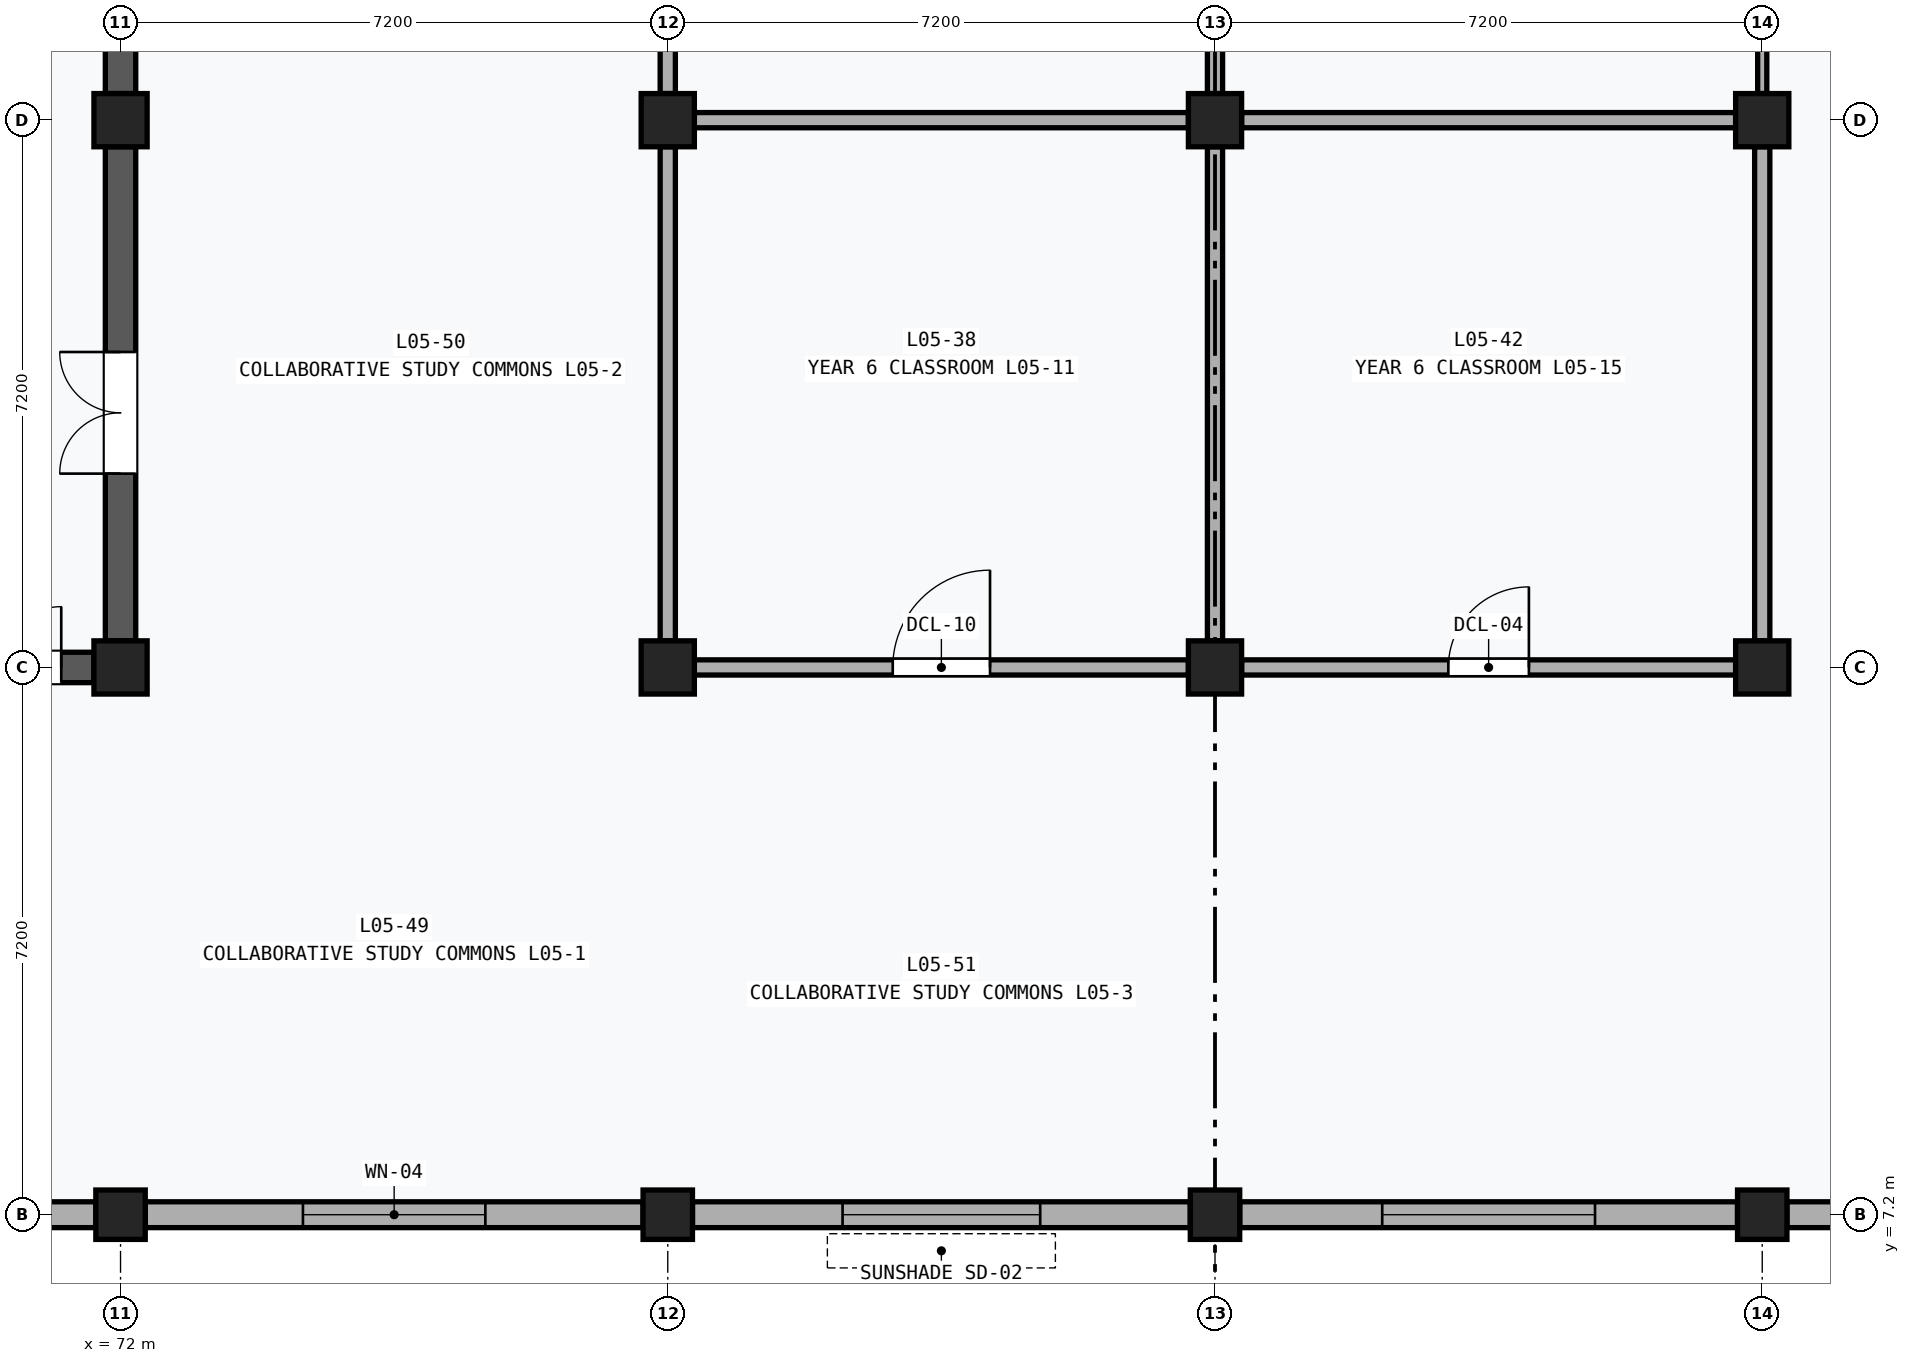
"""IFC4 building model, lengths in metres.
Left out: names, types, materials, properties, quantities, classifications, styles, units other than length and angle.
Written with IfcOpenShell. Run it as: python <this file> out.ifc"""

import sys

from ifc_helpers import new_model, si_unit, direction, frame, frame_2d, origin, origin_2d, place, context, subcontext, project, spatial, rectangle, extrude, element, fill, save


model = new_model("IFC4")
c1 = context("Model", 3, precision=1e-05, world=origin(), true_north=direction((0.0, 1.0)))
c2 = subcontext(c1, "Body", "Model", "MODEL_VIEW")
j1 = project(units=[si_unit("LENGTHUNIT", "METRE"), si_unit("PLANEANGLEUNIT", "RADIAN")], contexts=[c1])
p1 = place(None, origin())
s1 = spatial("IfcSite", under=j1, at=p1, CompositionType="ELEMENT")
p2 = place(p1, origin())
s2 = spatial("IfcBuilding", under=s1, at=p2, CompositionType="ELEMENT")
p3 = place(p2, frame((0.0, 0.0, 22.6)))
s3 = spatial("IfcBuildingStorey", under=s2, at=p3, CompositionType="ELEMENT", Elevation=22.6)
p4 = place(p3, frame((72.0, 7.2, 0.0), z_axis=(0.0, 0.0, 1.0), x_axis=(1.0, 0.0, 0.0)))
e1 = element("IfcColumn", 1, at=p4, inside=s3, PredefinedType="COLUMN", context=c2, shape_type="SweptSolid", body=[
    extrude(rectangle(XDim=0.65, YDim=0.65, at=origin_2d()), origin(), (0.0, 0.0, 1.0), 4.0),
])
for number, where, z_axis, x_axis in (
    (2, (72.0, 14.4, 0.0), (0.0, 0.0, 1.0), (1.0, 0.0, 0.0)),
    (3, (72.0, 21.6, 0.0), (0.0, 0.0, 1.0), (1.0, 0.0, 0.0)),
):
    element("IfcColumn", number, at=place(p3, frame(where, z_axis=z_axis, x_axis=x_axis)), inside=s3, PredefinedType="COLUMN", context=c2, shape_type="SweptSolid", body=[
        extrude(rectangle(XDim=0.7, YDim=0.7, at=origin_2d()), origin(), (0.0, 0.0, 1.0), 4.0),
    ])
p5 = place(p3, frame((79.2, 7.2, 0.0), z_axis=(0.0, 0.0, 1.0), x_axis=(1.0, 0.0, 0.0)))
e4 = element("IfcColumn", 4, at=p5, inside=s3, PredefinedType="COLUMN", context=c2, shape_type="SweptSolid", body=[
    extrude(rectangle(XDim=0.65, YDim=0.65, at=origin_2d()), origin(), (0.0, 0.0, 1.0), 4.0),
])
for number, where, z_axis, x_axis in (
    (5, (79.2, 14.4, 0.0), (0.0, 0.0, 1.0), (1.0, 0.0, 0.0)),
    (6, (79.2, 21.6, 0.0), (0.0, 0.0, 1.0), (1.0, 0.0, 0.0)),
):
    element("IfcColumn", number, at=place(p3, frame(where, z_axis=z_axis, x_axis=x_axis)), inside=s3, PredefinedType="COLUMN", context=c2, shape_type="SweptSolid", body=[
        extrude(rectangle(XDim=0.7, YDim=0.7, at=origin_2d()), origin(), (0.0, 0.0, 1.0), 4.0),
    ])
p6 = place(p3, frame((86.4, 7.2, 0.0), z_axis=(0.0, 0.0, 1.0), x_axis=(1.0, 0.0, 0.0)))
e7 = element("IfcColumn", 7, at=p6, inside=s3, PredefinedType="COLUMN", context=c2, shape_type="SweptSolid", body=[
    extrude(rectangle(XDim=0.65, YDim=0.65, at=origin_2d()), origin(), (0.0, 0.0, 1.0), 4.0),
])
for number, where, z_axis, x_axis in (
    (8, (86.4, 14.4, 0.0), (0.0, 0.0, 1.0), (1.0, 0.0, 0.0)),
    (9, (86.4, 21.6, 0.0), (0.0, 0.0, 1.0), (1.0, 0.0, 0.0)),
):
    element("IfcColumn", number, at=place(p3, frame(where, z_axis=z_axis, x_axis=x_axis)), inside=s3, PredefinedType="COLUMN", context=c2, shape_type="SweptSolid", body=[
        extrude(rectangle(XDim=0.7, YDim=0.7, at=origin_2d()), origin(), (0.0, 0.0, 1.0), 4.0),
    ])
p7 = place(p3, frame((93.6, 7.2, 0.0), z_axis=(0.0, 0.0, 1.0), x_axis=(1.0, 0.0, 0.0)))
e10 = element("IfcColumn", 10, at=p7, inside=s3, PredefinedType="COLUMN", context=c2, shape_type="SweptSolid", body=[
    extrude(rectangle(XDim=0.65, YDim=0.65, at=origin_2d()), origin(), (0.0, 0.0, 1.0), 4.0),
])
for number, where, z_axis, x_axis in (
    (11, (93.6, 14.4, 0.0), (0.0, 0.0, 1.0), (1.0, 0.0, 0.0)),
    (12, (93.6, 21.6, 0.0), (0.0, 0.0, 1.0), (1.0, 0.0, 0.0)),
):
    element("IfcColumn", number, at=place(p3, frame(where, z_axis=z_axis, x_axis=x_axis)), inside=s3, PredefinedType="COLUMN", context=c2, shape_type="SweptSolid", body=[
        extrude(rectangle(XDim=0.7, YDim=0.7, at=origin_2d()), origin(), (0.0, 0.0, 1.0), 4.0),
    ])
p8 = place(p3, frame((65.05, 7.2, 0.0), z_axis=(0.0, 0.0, 1.0), x_axis=(1.0, 0.0, 0.0)))
e13 = element("IfcWall", 13, at=p8, inside=s3, PredefinedType="SOLIDWALL", context=c2, shape_type="SweptSolid", body=[
    extrude(rectangle(XDim=6.625, YDim=0.34, at=frame_2d((3.312, 0.0))), origin(), (0.0, 0.0, 1.0), 3.12),
])
p9 = place(p8, frame((2.212, 0.0, 0.9)))
e14 = element("IfcOpeningElement", 14, at=p9, cuts=e13, PredefinedType="OPENING", context=c2, shape_type="SweptSolid", body=[
    extrude(rectangle(XDim=2.2, YDim=1.8, at=frame_2d((1.1, 0.9))), frame((0.0, 0.182, 0.0), z_axis=(0.0, -1.0, 0.0), x_axis=(1.0, 0.0, 0.0)), (0.0, 0.0, 1.0), 0.364),
])
p10 = place(p3, frame((72.325, 7.2, 0.0), z_axis=(0.0, 0.0, 1.0), x_axis=(1.0, 0.0, 0.0)))
e15 = element("IfcWall", 15, at=p10, inside=s3, PredefinedType="SOLIDWALL", context=c2, shape_type="SweptSolid", body=[
    extrude(rectangle(XDim=6.55, YDim=0.34, at=frame_2d((3.275, 0.0))), origin(), (0.0, 0.0, 1.0), 3.12),
])
p11 = place(p10, frame((2.075, 0.0, 0.9)))
e16 = element("IfcOpeningElement", 16, at=p11, cuts=e15, PredefinedType="OPENING", context=c2, shape_type="SweptSolid", body=[
    extrude(rectangle(XDim=2.4, YDim=1.8, at=frame_2d((1.2, 0.9))), frame((0.0, 0.182, 0.0), z_axis=(0.0, -1.0, 0.0), x_axis=(1.0, 0.0, 0.0)), (0.0, 0.0, 1.0), 0.364),
])
p12 = place(p3, frame((79.525, 7.2, 0.0), z_axis=(0.0, 0.0, 1.0), x_axis=(1.0, 0.0, 0.0)))
e17 = element("IfcWall", 17, at=p12, inside=s3, PredefinedType="SOLIDWALL", context=c2, shape_type="SweptSolid", body=[
    extrude(rectangle(XDim=6.55, YDim=0.34, at=frame_2d((3.275, 0.0))), origin(), (0.0, 0.0, 1.0), 3.12),
])
p13 = place(p12, frame((1.975, 0.0, 0.9)))
e18 = element("IfcOpeningElement", 18, at=p13, cuts=e17, PredefinedType="OPENING", context=c2, shape_type="SweptSolid", body=[
    extrude(rectangle(XDim=2.6, YDim=1.8, at=frame_2d((1.3, 0.9))), frame((0.0, 0.182, 0.0), z_axis=(0.0, -1.0, 0.0), x_axis=(1.0, 0.0, 0.0)), (0.0, 0.0, 1.0), 0.364),
])
p14 = place(p3, frame((86.725, 7.2, 0.0), z_axis=(0.0, 0.0, 1.0), x_axis=(1.0, 0.0, 0.0)))
e19 = element("IfcWall", 19, at=p14, inside=s3, PredefinedType="SOLIDWALL", context=c2, shape_type="SweptSolid", body=[
    extrude(rectangle(XDim=6.55, YDim=0.34, at=frame_2d((3.275, 0.0))), origin(), (0.0, 0.0, 1.0), 3.12),
])
p15 = place(p14, frame((1.875, 0.0, 0.9)))
e20 = element("IfcOpeningElement", 20, at=p15, cuts=e19, PredefinedType="OPENING", context=c2, shape_type="SweptSolid", body=[
    extrude(rectangle(XDim=2.8, YDim=1.8, at=frame_2d((1.4, 0.9))), frame((0.0, 0.182, 0.0), z_axis=(0.0, -1.0, 0.0), x_axis=(1.0, 0.0, 0.0)), (0.0, 0.0, 1.0), 0.364),
])
p16 = place(p3, frame((93.925, 7.2, 0.0), z_axis=(0.0, 0.0, 1.0), x_axis=(1.0, 0.0, 0.0)))
e21 = element("IfcWall", 21, at=p16, inside=s3, PredefinedType="SOLIDWALL", context=c2, shape_type="SweptSolid", body=[
    extrude(rectangle(XDim=6.625, YDim=0.34, at=frame_2d((3.312, 0.0))), origin(), (0.0, 0.0, 1.0), 3.12),
])
p17 = place(p16, frame((1.812, 0.0, 0.9)))
e22 = element("IfcOpeningElement", 22, at=p17, cuts=e21, PredefinedType="OPENING", context=c2, shape_type="SweptSolid", body=[
    extrude(rectangle(XDim=3.0, YDim=1.8, at=frame_2d((1.5, 0.9))), frame((0.0, 0.182, 0.0), z_axis=(0.0, -1.0, 0.0), x_axis=(1.0, 0.0, 0.0)), (0.0, 0.0, 1.0), 0.364),
])
p18 = place(p3, frame((72.0, 14.75, 0.0), z_axis=(0.0, 0.0, 1.0), x_axis=(0.0, 1.0, 0.0)))
e23 = element("IfcWall", 23, at=p18, inside=s3, PredefinedType="SHEAR", context=c2, shape_type="SweptSolid", body=[
    extrude(rectangle(XDim=6.5, YDim=0.4, at=frame_2d((3.25, 0.0))), origin(), (0.0, 0.0, 1.0), 2.98),
])
p19 = place(p18, frame((2.2, 0.0, 0.0)))
e24 = element("IfcOpeningElement", 24, at=p19, cuts=e23, PredefinedType="OPENING", context=c2, shape_type="SweptSolid", body=[
    extrude(rectangle(XDim=1.6, YDim=2.2, at=frame_2d((0.8, 1.1))), frame((0.0, 0.212, 0.0), z_axis=(0.0, -1.0, 0.0), x_axis=(1.0, 0.0, 0.0)), (0.0, 0.0, 1.0), 0.424),
])
p20 = place(p3, frame((72.0, 21.95, 0.0), z_axis=(0.0, 0.0, 1.0), x_axis=(0.0, 1.0, 0.0)))
e25 = element("IfcWall", 25, at=p20, inside=s3, PredefinedType="SHEAR", context=c2, shape_type="SweptSolid", body=[
    extrude(rectangle(XDim=6.5, YDim=0.4, at=frame_2d((3.25, 0.0))), origin(), (0.0, 0.0, 1.0), 2.98),
])
p21 = place(p3, frame((65.15, 14.4, 0.0), z_axis=(0.0, 0.0, 1.0), x_axis=(1.0, 0.0, 0.0)))
e26 = element("IfcWall", 26, at=p21, inside=s3, PredefinedType="SHEAR", context=c2, shape_type="SweptSolid", body=[
    extrude(rectangle(XDim=6.5, YDim=0.4, at=frame_2d((3.25, 0.0))), origin(), (0.0, 0.0, 1.0), 2.98),
])
p22 = place(p21, frame((4.47, 0.0, 0.0)))
e27 = element("IfcOpeningElement", 27, at=p22, cuts=e26, PredefinedType="OPENING", context=c2, shape_type="SweptSolid", body=[
    extrude(rectangle(XDim=1.6, YDim=2.2, at=frame_2d((0.8, 1.1))), frame((0.0, 0.212, 0.0), z_axis=(0.0, -1.0, 0.0), x_axis=(1.0, 0.0, 0.0)), (0.0, 0.0, 1.0), 0.424),
])
p23 = place(p3, frame((79.55, 14.4, 0.0), z_axis=(0.0, 0.0, 1.0), x_axis=(1.0, 0.0, 0.0)))
e28 = element("IfcWall", 28, at=p23, inside=s3, PredefinedType="PARTITIONING", context=c2, shape_type="SweptSolid", body=[
    extrude(rectangle(XDim=6.5, YDim=0.2, at=frame_2d((3.25, 0.0))), origin(), (0.0, 0.0, 1.0), 2.98),
])
p24 = place(p23, frame((2.61, 0.0, 0.0)))
e29 = element("IfcOpeningElement", 29, at=p24, cuts=e28, PredefinedType="OPENING", context=c2, shape_type="SweptSolid", body=[
    extrude(rectangle(XDim=1.28, YDim=2.28, at=frame_2d((0.64, 1.14))), frame((0.0, 0.112, 0.0), z_axis=(0.0, -1.0, 0.0), x_axis=(1.0, 0.0, 0.0)), (0.0, 0.0, 1.0), 0.224),
])
for number, where, z_axis, x_axis in (
    (30, (79.55, 21.6, 0.0), (0.0, 0.0, 1.0), (1.0, 0.0, 0.0)),
    (31, (79.2, 14.75, 0.0), (0.0, 0.0, 1.0), (0.0, 1.0, 0.0)),
    (32, (86.4, 14.75, 0.0), (0.0, 0.0, 1.0), (0.0, 1.0, 0.0)),
):
    element("IfcWall", number, at=place(p3, frame(where, z_axis=z_axis, x_axis=x_axis)), inside=s3, PredefinedType="PARTITIONING", context=c2, shape_type="SweptSolid", body=[
        extrude(rectangle(XDim=6.5, YDim=0.2, at=frame_2d((3.25, 0.0))), origin(), (0.0, 0.0, 1.0), 2.98),
    ])
p25 = place(p3, frame((79.2, 21.95, 0.0), z_axis=(0.0, 0.0, 1.0), x_axis=(0.0, 1.0, 0.0)))
e33 = element("IfcWall", 33, at=p25, inside=s3, PredefinedType="PARTITIONING", context=c2, shape_type="SweptSolid", body=[
    extrude(rectangle(XDim=6.5, YDim=0.2, at=frame_2d((3.25, 0.0))), origin(), (0.0, 0.0, 1.0), 2.98),
])
p26 = place(p25, frame((2.75, 0.0, 0.0)))
e34 = element("IfcOpeningElement", 34, at=p26, cuts=e33, PredefinedType="OPENING", context=c2, shape_type="SweptSolid", body=[
    extrude(rectangle(XDim=1.0, YDim=2.1, at=frame_2d((0.5, 1.05))), frame((0.0, 0.112, 0.0), z_axis=(0.0, -1.0, 0.0), x_axis=(1.0, 0.0, 0.0)), (0.0, 0.0, 1.0), 0.224),
])
p27 = place(p3, frame((86.4, 21.95, 0.0), z_axis=(0.0, 0.0, 1.0), x_axis=(0.0, 1.0, 0.0)))
e35 = element("IfcWall", 35, at=p27, inside=s3, PredefinedType="PARTITIONING", context=c2, shape_type="SweptSolid", body=[
    extrude(rectangle(XDim=6.5, YDim=0.2, at=frame_2d((3.25, 0.0))), origin(), (0.0, 0.0, 1.0), 2.98),
])
p28 = place(p3, frame((86.75, 14.4, 0.0), z_axis=(0.0, 0.0, 1.0), x_axis=(1.0, 0.0, 0.0)))
e36 = element("IfcWall", 36, at=p28, inside=s3, PredefinedType="PARTITIONING", context=c2, shape_type="SweptSolid", body=[
    extrude(rectangle(XDim=6.5, YDim=0.2, at=frame_2d((3.25, 0.0))), origin(), (0.0, 0.0, 1.0), 2.98),
])
p29 = place(p28, frame((2.72, 0.0, 0.0)))
e37 = element("IfcOpeningElement", 37, at=p29, cuts=e36, PredefinedType="OPENING", context=c2, shape_type="SweptSolid", body=[
    extrude(rectangle(XDim=1.06, YDim=2.16, at=frame_2d((0.53, 1.08))), frame((0.0, 0.112, 0.0), z_axis=(0.0, -1.0, 0.0), x_axis=(1.0, 0.0, 0.0)), (0.0, 0.0, 1.0), 0.224),
])
for number, where, z_axis, x_axis in (
    (38, (86.75, 21.6, 0.0), (0.0, 0.0, 1.0), (1.0, 0.0, 0.0)),
    (39, (93.6, 14.75, 0.0), (0.0, 0.0, 1.0), (0.0, 1.0, 0.0)),
):
    element("IfcWall", number, at=place(p3, frame(where, z_axis=z_axis, x_axis=x_axis)), inside=s3, PredefinedType="PARTITIONING", context=c2, shape_type="SweptSolid", body=[
        extrude(rectangle(XDim=6.5, YDim=0.2, at=frame_2d((3.25, 0.0))), origin(), (0.0, 0.0, 1.0), 2.98),
    ])
p30 = place(p3, frame((93.6, 21.95, 0.0), z_axis=(0.0, 0.0, 1.0), x_axis=(0.0, 1.0, 0.0)))
e40 = element("IfcWall", 40, at=p30, inside=s3, PredefinedType="MOVABLE", context=c2, shape_type="SweptSolid", body=[
    extrude(rectangle(XDim=6.5, YDim=0.12, at=frame_2d((3.25, 0.0))), origin(), (0.0, 0.0, 1.0), 2.98),
])
p31 = place(p30, frame((2.71, 0.0, 0.0)))
e41 = element("IfcOpeningElement", 41, at=p31, cuts=e40, PredefinedType="OPENING", context=c2, shape_type="SweptSolid", body=[
    extrude(rectangle(XDim=1.08, YDim=2.18, at=frame_2d((0.54, 1.09))), frame((0.0, 0.072, 0.0), z_axis=(0.0, -1.0, 0.0), x_axis=(1.0, 0.0, 0.0)), (0.0, 0.0, 1.0), 0.144),
])
p32 = place(p11, origin())
e42 = element("IfcWindow", 42, at=p32, inside=s3, PartitioningType="SINGLE_PANEL", PredefinedType="WINDOW", context=c2, shape_type="SweptSolid", body=[
    extrude(rectangle(XDim=2.4, YDim=1.8, at=frame_2d((1.2, 0.9))), frame((0.0, 0.03, 0.0), z_axis=(0.0, -1.0, 0.0), x_axis=(1.0, 0.0, 0.0)), (0.0, 0.0, 1.0), 0.06),
])
fill(e16, e42)
p33 = place(p13, origin())
e43 = element("IfcWindow", 43, at=p33, inside=s3, PartitioningType="SINGLE_PANEL", PredefinedType="WINDOW", context=c2, shape_type="SweptSolid", body=[
    extrude(rectangle(XDim=2.6, YDim=1.8, at=frame_2d((1.3, 0.9))), frame((0.0, 0.03, 0.0), z_axis=(0.0, -1.0, 0.0), x_axis=(1.0, 0.0, 0.0)), (0.0, 0.0, 1.0), 0.06),
])
fill(e18, e43)
p34 = place(p15, origin())
e44 = element("IfcWindow", 44, at=p34, inside=s3, PartitioningType="SINGLE_PANEL", PredefinedType="WINDOW", context=c2, shape_type="SweptSolid", body=[
    extrude(rectangle(XDim=2.8, YDim=1.8, at=frame_2d((1.4, 0.9))), frame((0.0, 0.03, 0.0), z_axis=(0.0, -1.0, 0.0), x_axis=(1.0, 0.0, 0.0)), (0.0, 0.0, 1.0), 0.06),
])
fill(e20, e44)
p35 = place(p19, origin())
e45 = element("IfcDoor", 45, at=p35, inside=s3, OperationType="DOUBLE_DOOR_SINGLE_SWING", PredefinedType="DOOR", context=c2, shape_type="SweptSolid", body=[
    extrude(rectangle(XDim=1.6, YDim=2.2, at=frame_2d((0.8, 1.1))), frame((0.0, 0.025, 0.0), z_axis=(0.0, -1.0, 0.0), x_axis=(1.0, 0.0, 0.0)), (0.0, 0.0, 1.0), 0.05),
])
fill(e24, e45)
p36 = place(p22, origin())
e46 = element("IfcDoor", 46, at=p36, inside=s3, OperationType="DOUBLE_DOOR_SINGLE_SWING", PredefinedType="DOOR", context=c2, shape_type="SweptSolid", body=[
    extrude(rectangle(XDim=1.6, YDim=2.2, at=frame_2d((0.8, 1.1))), frame((0.0, 0.025, 0.0), z_axis=(0.0, -1.0, 0.0), x_axis=(1.0, 0.0, 0.0)), (0.0, 0.0, 1.0), 0.05),
])
fill(e27, e46)
p37 = place(p24, origin())
e47 = element("IfcDoor", 47, at=p37, inside=s3, OperationType="SINGLE_SWING_RIGHT", PredefinedType="DOOR", context=c2, shape_type="SweptSolid", body=[
    extrude(rectangle(XDim=1.28, YDim=2.28, at=frame_2d((0.64, 1.14))), frame((0.0, 0.025, 0.0), z_axis=(0.0, -1.0, 0.0), x_axis=(1.0, 0.0, 0.0)), (0.0, 0.0, 1.0), 0.05),
])
fill(e29, e47)
p38 = place(p29, origin())
e48 = element("IfcDoor", 48, at=p38, inside=s3, OperationType="SINGLE_SWING_RIGHT", PredefinedType="DOOR", context=c2, shape_type="SweptSolid", body=[
    extrude(rectangle(XDim=1.06, YDim=2.16, at=frame_2d((0.53, 1.08))), frame((0.0, 0.025, 0.0), z_axis=(0.0, -1.0, 0.0), x_axis=(1.0, 0.0, 0.0)), (0.0, 0.0, 1.0), 0.05),
])
fill(e37, e48)
save(model, sys.argv[1])
